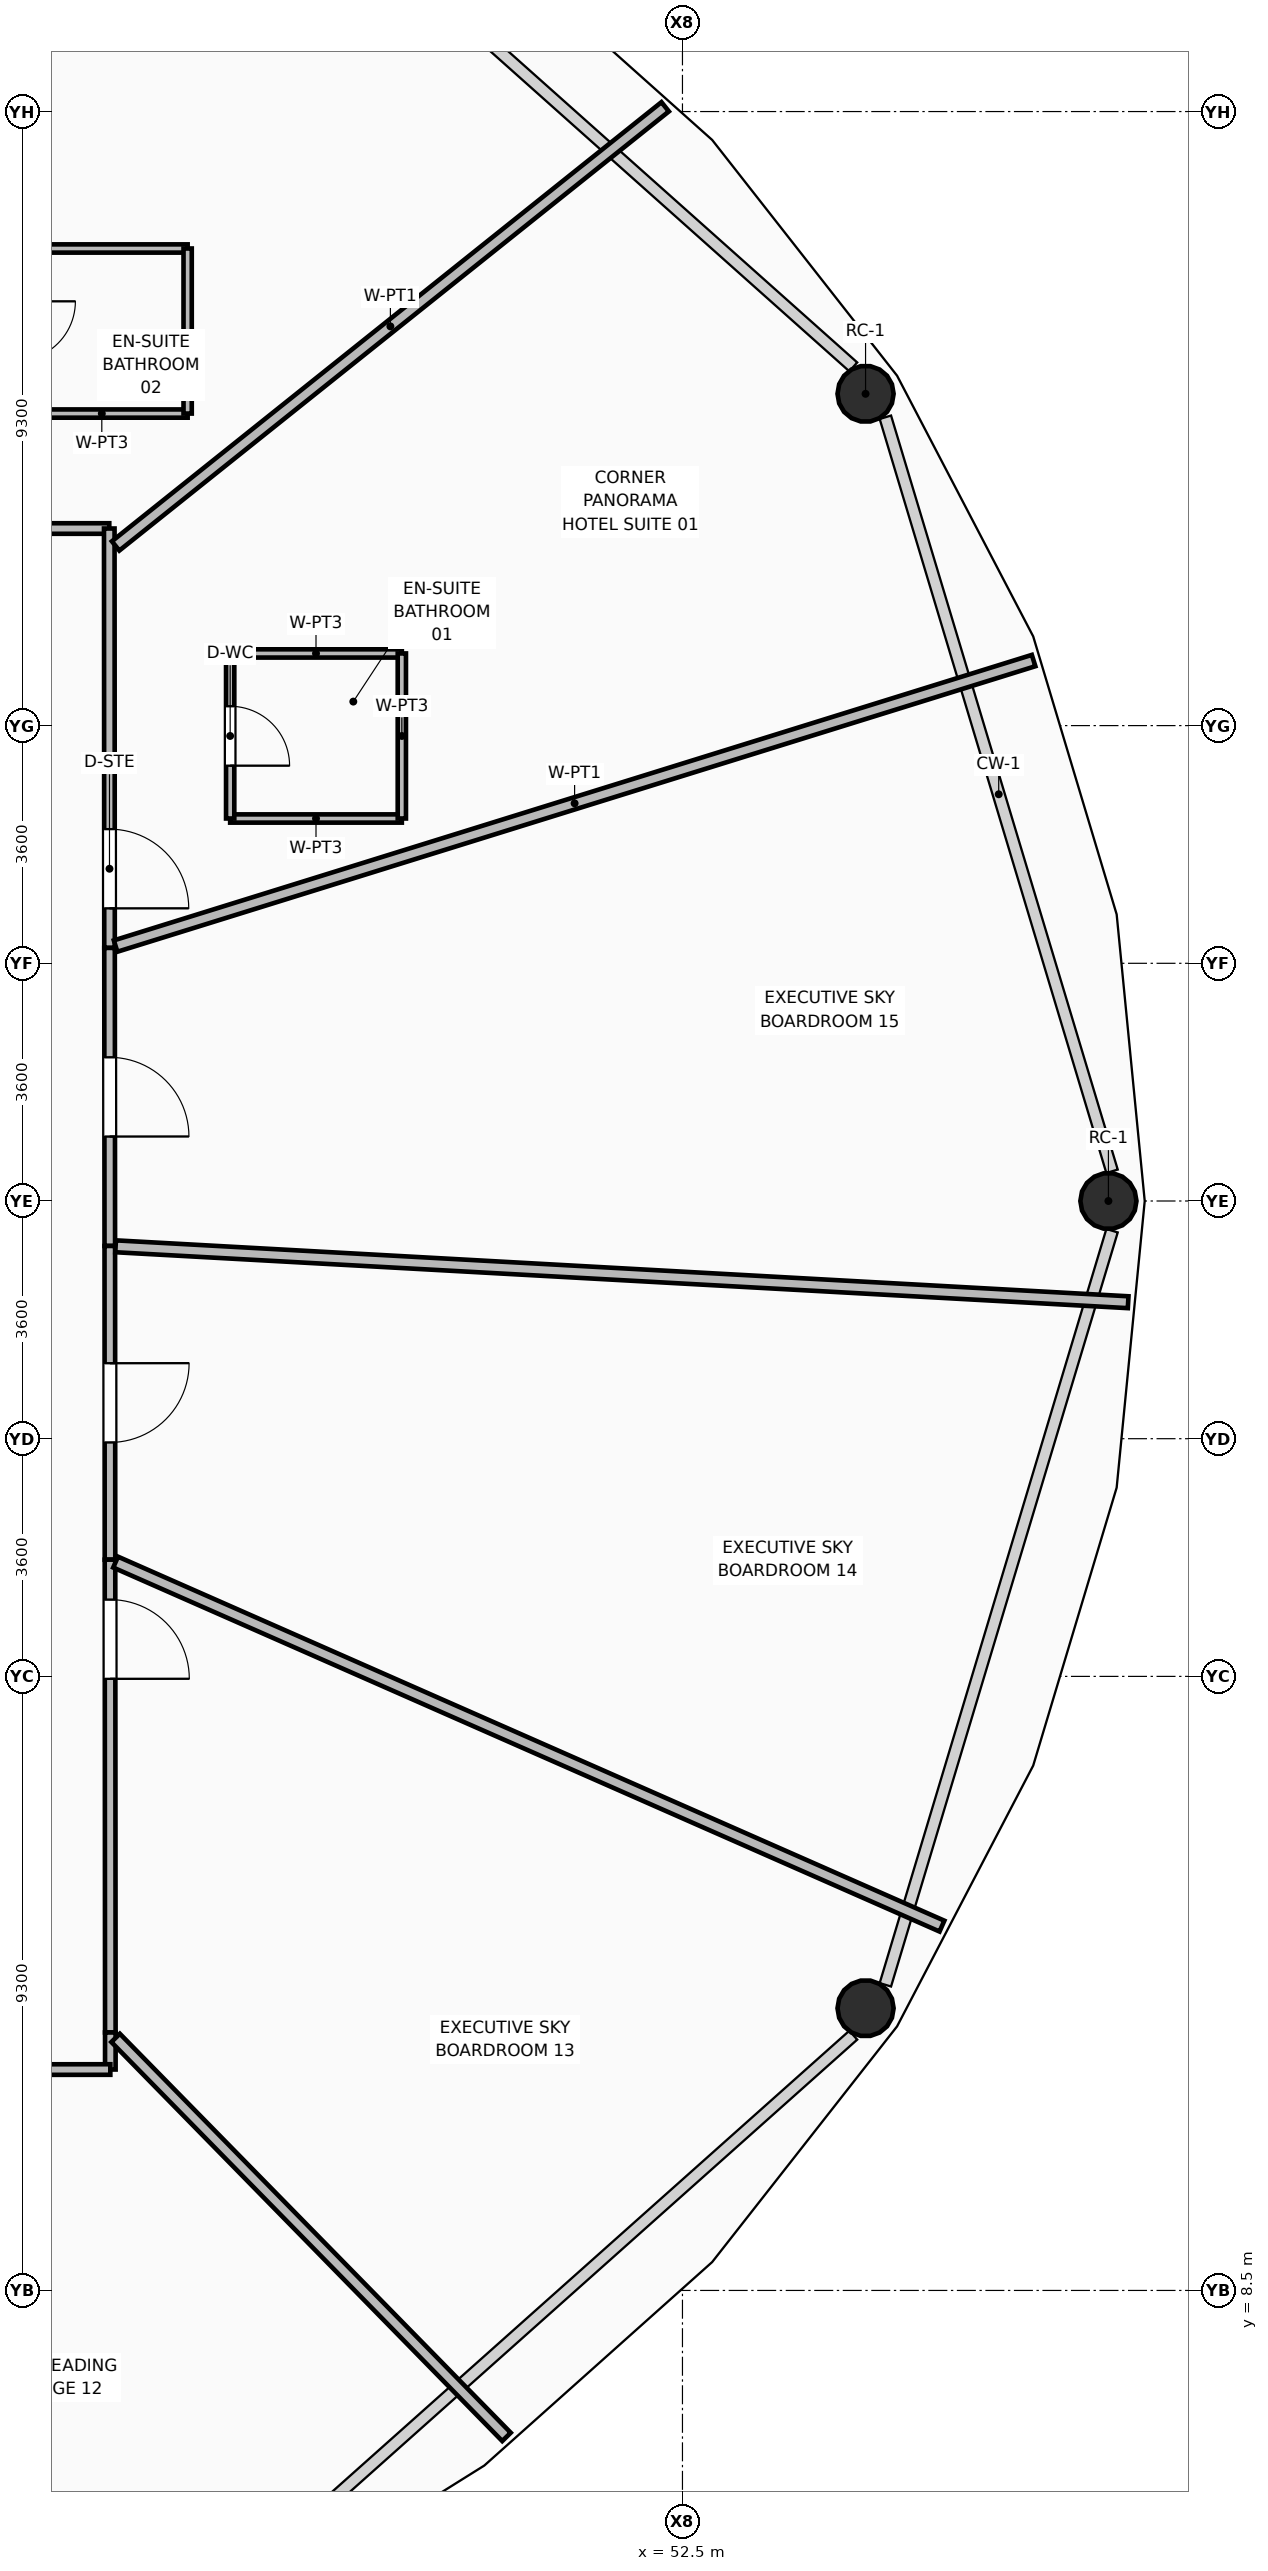
"""IFC4 building model, lengths in metres.
Left out: names, types, materials, properties, quantities, classifications, styles, units other than length and angle.
Written with IfcOpenShell. Run it as: python <this file> out.ifc"""

import sys

from ifc_helpers import new_model, si_unit, direction, frame, frame_2d, origin, origin_2d, place, context, subcontext, project, spatial, rectangle, hollow_circle, extrude, element, fill, save


model = new_model("IFC4")
c1 = context("Model", 3, precision=1e-05, world=origin(), true_north=direction((0.0, 1.0)))
c2 = subcontext(c1, "Body", "Model", "MODEL_VIEW")
j1 = project(units=[si_unit("LENGTHUNIT", "METRE"), si_unit("PLANEANGLEUNIT", "RADIAN")], contexts=[c1])
p1 = place(None, origin())
s1 = spatial("IfcSite", under=j1, at=p1, CompositionType="ELEMENT")
p2 = place(p1, origin())
s2 = spatial("IfcBuilding", under=s1, at=p2, CompositionType="ELEMENT")
p3 = place(p2, frame((0.0, 0.0, 60.75)))
s3 = spatial("IfcBuildingStorey", under=s2, at=p3, CompositionType="ELEMENT", Elevation=60.75)
for number, where, z_axis, x_axis in (
    (1, (58.951, 25.0, 0.0), (0.0, 0.0, 1.0), (1.0, 0.0, 0.0)),
    (2, (55.273, 37.225, 0.0), (0.0, 0.0, 1.0), (1.0, 0.0, 0.0)),
    (3, (55.273, 12.774, 0.0), (0.0, 0.0, 1.0), (1.0, 0.0, 0.0)),
):
    element("IfcColumn", number, at=place(p3, frame(where, z_axis=z_axis, x_axis=x_axis)), inside=s3, PredefinedType="COLUMN", context=c2, shape_type="SweptSolid", body=[
        extrude(hollow_circle(Radius=0.425, WallThickness=0.04, at=origin_2d()), origin(), (0.0, 0.0, 1.0), 3.57),
    ])
p4 = place(p3, frame((37.0, 35.185, 0.0), z_axis=(0.0, 0.0, 1.0), x_axis=(1.0, 0.0, 0.0)))
e4 = element("IfcWall", 4, at=p4, inside=s3, PredefinedType="PARTITIONING", context=c2, shape_type="SweptSolid", body=[
    extrude(rectangle(XDim=6.819, YDim=0.16, at=frame_2d((3.41, 0.0))), origin(), (0.0, 0.0, 1.0), 2.928),
])
p5 = place(p4, frame((1.338, 0.0, 0.0)))
e5 = element("IfcOpeningElement", 5, at=p5, cuts=e4, PredefinedType="OPENING", context=c2, shape_type="SweptSolid", body=[
    extrude(rectangle(XDim=1.2, YDim=2.1, at=frame_2d((0.6, 1.05))), frame((0.0, 0.09, 0.0), z_axis=(0.0, -1.0, 0.0), x_axis=(1.0, 0.0, 0.0)), (0.0, 0.0, 1.0), 0.18),
])
p6 = place(p3, frame((43.819, 35.185, 0.0), z_axis=(0.0, 0.0, 1.0), x_axis=(0.000614958758, -0.999999810913, 0.0)))
e6 = element("IfcWall", 6, at=p6, inside=s3, PredefinedType="PARTITIONING", context=c2, shape_type="SweptSolid", body=[
    extrude(rectangle(XDim=6.352, YDim=0.16, at=frame_2d((3.176, 0.0))), origin(), (0.0, 0.0, 1.0), 2.928),
])
p7 = place(p6, frame((4.553, 0.0, 0.0)))
e7 = element("IfcOpeningElement", 7, at=p7, cuts=e6, PredefinedType="OPENING", context=c2, shape_type="SweptSolid", body=[
    extrude(rectangle(XDim=1.2, YDim=2.1, at=frame_2d((0.6, 1.05))), frame((0.0, 0.09, 0.0), z_axis=(0.0, -1.0, 0.0), x_axis=(1.0, 0.0, 0.0)), (0.0, 0.0, 1.0), 0.18),
])
p8 = place(p3, frame((43.823, 28.833, 0.0), z_axis=(0.0, 0.0, 1.0), x_axis=(0.000865379091, -0.999999625559, 0.0)))
e8 = element("IfcWall", 8, at=p8, inside=s3, PredefinedType="PARTITIONING", context=c2, shape_type="SweptSolid", body=[
    extrude(rectangle(XDim=4.514, YDim=0.16, at=frame_2d((2.257, 0.0))), origin(), (0.0, 0.0, 1.0), 3.55),
])
p9 = place(p8, frame((1.657, 0.0, 0.0)))
e9 = element("IfcOpeningElement", 9, at=p9, cuts=e8, PredefinedType="OPENING", context=c2, shape_type="SweptSolid", body=[
    extrude(rectangle(XDim=1.2, YDim=2.1, at=frame_2d((0.6, 1.05))), frame((0.0, 0.09, 0.0), z_axis=(0.0, -1.0, 0.0), x_axis=(1.0, 0.0, 0.0)), (0.0, 0.0, 1.0), 0.18),
])
p10 = place(p3, frame((43.827, 24.319, 0.0), z_axis=(0.0, 0.0, 1.0), x_axis=(0.00066803685, -0.999999776863, 0.0)))
e10 = element("IfcWall", 10, at=p10, inside=s3, PredefinedType="PARTITIONING", context=c2, shape_type="SweptSolid", body=[
    extrude(rectangle(XDim=4.751, YDim=0.16, at=frame_2d((2.375, 0.0))), origin(), (0.0, 0.0, 1.0), 2.928),
])
p11 = place(p10, frame((1.776, 0.0, 0.0)))
e11 = element("IfcOpeningElement", 11, at=p11, cuts=e10, PredefinedType="OPENING", context=c2, shape_type="SweptSolid", body=[
    extrude(rectangle(XDim=1.2, YDim=2.1, at=frame_2d((0.6, 1.05))), frame((0.0, 0.09, 0.0), z_axis=(0.0, -1.0, 0.0), x_axis=(1.0, 0.0, 0.0)), (0.0, 0.0, 1.0), 0.18),
])
p12 = place(p3, frame((43.83, 19.568, 0.0), z_axis=(0.0, 0.0, 1.0), x_axis=(0.000681849016, -0.999999767541, 0.0)))
e12 = element("IfcWall", 12, at=p12, inside=s3, PredefinedType="PARTITIONING", context=c2, shape_type="SweptSolid", body=[
    extrude(rectangle(XDim=7.161, YDim=0.16, at=frame_2d((3.581, 0.0))), origin(), (0.0, 0.0, 1.0), 2.928),
])
p13 = place(p12, frame((0.605, 0.0, 0.0)))
e13 = element("IfcOpeningElement", 13, at=p13, cuts=e12, PredefinedType="OPENING", context=c2, shape_type="SweptSolid", body=[
    extrude(rectangle(XDim=1.2, YDim=2.1, at=frame_2d((0.6, 1.05))), frame((0.0, 0.09, 0.0), z_axis=(0.0, -1.0, 0.0), x_axis=(1.0, 0.0, 0.0)), (0.0, 0.0, 1.0), 0.18),
])
p14 = place(p3, frame((43.835, 12.407, 0.0), z_axis=(0.0, 0.0, 1.0), x_axis=(0.0, -1.0, 0.0)))
e14 = element("IfcWall", 14, at=p14, inside=s3, PredefinedType="PARTITIONING", context=c2, shape_type="SweptSolid", body=[
    extrude(rectangle(XDim=0.561, YDim=0.16, at=frame_2d((0.281, 0.0))), origin(), (0.0, 0.0, 1.0), 3.55),
])
p15 = place(p3, frame((43.835, 11.846, 0.0), z_axis=(0.0, 0.0, 1.0), x_axis=(-0.999999777452, -0.000667155766, 0.0)))
e15 = element("IfcWall", 15, at=p15, inside=s3, PredefinedType="PARTITIONING", context=c2, shape_type="SweptSolid", body=[
    extrude(rectangle(XDim=7.319, YDim=0.16, at=frame_2d((3.659, 0.0))), origin(), (0.0, 0.0, 1.0), 2.928),
])
p16 = place(p15, frame((2.985, 0.0, 0.0)))
e16 = element("IfcOpeningElement", 16, at=p16, cuts=e15, PredefinedType="OPENING", context=c2, shape_type="SweptSolid", body=[
    extrude(rectangle(XDim=1.2, YDim=2.1, at=frame_2d((0.6, 1.05))), frame((0.0, 0.09, 0.0), z_axis=(0.0, -1.0, 0.0), x_axis=(1.0, 0.0, 0.0)), (0.0, 0.0, 1.0), 0.18),
])
p17 = place(p3, frame((43.915, 28.861, 0.0), z_axis=(0.0, 0.0, 1.0), x_axis=(0.954884570259, 0.296977200271, 0.0)))
e17 = element("IfcWall", 17, at=p17, inside=s3, PredefinedType="PARTITIONING", context=c2, shape_type="SweptSolid", body=[
    extrude(rectangle(XDim=14.56, YDim=0.18, at=frame_2d((7.28, 0.0))), origin(), (0.0, 0.0, 1.0), 2.775),
])
p18 = place(p3, frame((43.915, 34.921, 0.0), z_axis=(0.0, 0.0, 1.0), x_axis=(0.781201807071, 0.624278572938, 0.0)))
e18 = element("IfcWall", 18, at=p18, inside=s3, PredefinedType="PARTITIONING", context=c2, shape_type="SweptSolid", body=[
    extrude(rectangle(XDim=10.654, YDim=0.18, at=frame_2d((5.327, 0.0))), origin(), (0.0, 0.0, 1.0), 2.775),
])
p19 = place(p3, frame((37.043, 35.265, 0.0), z_axis=(0.0, 0.0, 1.0), x_axis=(0.475167084094, 0.879895585961, 0.0)))
e19 = element("IfcWall", 19, at=p19, inside=s3, PredefinedType="PARTITIONING", context=c2, shape_type="SweptSolid", body=[
    extrude(rectangle(XDim=13.732, YDim=0.18, at=frame_2d((6.866, 0.0))), origin(), (0.0, 0.0, 1.0), 2.775),
])
p20 = place(p3, frame((43.915, 12.325, 0.0), z_axis=(0.0, 0.0, 1.0), x_axis=(0.699796666029, -0.714342093268, 0.0)))
e20 = element("IfcWall", 20, at=p20, inside=s3, PredefinedType="PARTITIONING", context=c2, shape_type="SweptSolid", body=[
    extrude(rectangle(XDim=8.459, YDim=0.18, at=frame_2d((4.23, 0.0))), origin(), (0.0, 0.0, 1.0), 2.775),
])
p21 = place(p3, frame((43.915, 19.531, 0.0), z_axis=(0.0, 0.0, 1.0), x_axis=(0.915142788341, -0.403129851223, 0.0)))
e21 = element("IfcWall", 21, at=p21, inside=s3, PredefinedType="PARTITIONING", context=c2, shape_type="SweptSolid", body=[
    extrude(rectangle(XDim=13.675, YDim=0.18, at=frame_2d((6.838, 0.0))), origin(), (0.0, 0.0, 1.0), 2.775),
])
p22 = place(p3, frame((43.915, 24.314, 0.0), z_axis=(0.0, 0.0, 1.0), x_axis=(0.998478397393, -0.055144264799, 0.0)))
e22 = element("IfcWall", 22, at=p22, inside=s3, PredefinedType="PARTITIONING", context=c2, shape_type="SweptSolid", body=[
    extrude(rectangle(XDim=15.358, YDim=0.18, at=frame_2d((7.679, 0.0))), origin(), (0.0, 0.0, 1.0), 2.775),
])
for number, where, z_axis, x_axis in (
    (23, (45.65, 30.793, 0.0), (0.0, 0.0, 1.0), (1.0, 0.0, 0.0)),
    (24, (45.65, 33.293, 0.0), (0.0, 0.0, 1.0), (1.0, 0.0, 0.0)),
):
    element("IfcWall", number, at=place(p3, frame(where, z_axis=z_axis, x_axis=x_axis)), inside=s3, PredefinedType="PARTITIONING", context=c2, shape_type="SweptSolid", body=[
        extrude(rectangle(XDim=2.6, YDim=0.125, at=frame_2d((1.3, 0.0))), origin(), (0.0, 0.0, 1.0), 3.55),
    ])
p23 = place(p3, frame((45.65, 30.793, 0.0), z_axis=(0.0, 0.0, 1.0), x_axis=(0.0, 1.0, 0.0)))
e25 = element("IfcWall", 25, at=p23, inside=s3, PredefinedType="PARTITIONING", context=c2, shape_type="SweptSolid", body=[
    extrude(rectangle(XDim=2.5, YDim=0.125, at=frame_2d((1.25, 0.0))), origin(), (0.0, 0.0, 1.0), 3.55),
])
p24 = place(p23, frame((0.8, 0.0, 0.0)))
e26 = element("IfcOpeningElement", 26, at=p24, cuts=e25, PredefinedType="OPENING", context=c2, shape_type="SweptSolid", body=[
    extrude(rectangle(XDim=0.9, YDim=2.1, at=frame_2d((0.45, 1.05))), frame((0.0, 0.073, 0.0), z_axis=(0.0, -1.0, 0.0), x_axis=(1.0, 0.0, 0.0)), (0.0, 0.0, 1.0), 0.145),
])
p25 = place(p3, frame((48.25, 30.793, 0.0), z_axis=(0.0, 0.0, 1.0), x_axis=(0.0, 1.0, 0.0)))
e27 = element("IfcWall", 27, at=p25, inside=s3, PredefinedType="PARTITIONING", context=c2, shape_type="SweptSolid", body=[
    extrude(rectangle(XDim=2.5, YDim=0.125, at=frame_2d((1.25, 0.0))), origin(), (0.0, 0.0, 1.0), 3.55),
])
for number, where, z_axis, x_axis in (
    (28, (42.406, 36.926, 0.0), (0.0, 0.0, 1.0), (1.0, 0.0, 0.0)),
    (29, (42.406, 39.426, 0.0), (0.0, 0.0, 1.0), (1.0, 0.0, 0.0)),
):
    element("IfcWall", number, at=place(p3, frame(where, z_axis=z_axis, x_axis=x_axis)), inside=s3, PredefinedType="PARTITIONING", context=c2, shape_type="SweptSolid", body=[
        extrude(rectangle(XDim=2.6, YDim=0.125, at=frame_2d((1.3, 0.0))), origin(), (0.0, 0.0, 1.0), 2.928),
    ])
p26 = place(p3, frame((45.006, 36.926, 0.0), z_axis=(0.0, 0.0, 1.0), x_axis=(0.0, 1.0, 0.0)))
e30 = element("IfcWall", 30, at=p26, inside=s3, PredefinedType="PARTITIONING", context=c2, shape_type="SweptSolid", body=[
    extrude(rectangle(XDim=2.5, YDim=0.125, at=frame_2d((1.25, 0.0))), origin(), (0.0, 0.0, 1.0), 3.55),
])
p27 = place(p24, frame((0.9, 0.0, 0.0), z_axis=(0.0, 0.0, 1.0), x_axis=(-1.0, 0.0, 0.0)))
e31 = element("IfcDoor", 31, at=p27, inside=s3, OperationType="SINGLE_SWING_RIGHT", PredefinedType="DOOR", context=c2, shape_type="SweptSolid", body=[
    extrude(rectangle(XDim=0.9, YDim=2.1, at=frame_2d((0.45, 1.05))), frame((0.0, 0.025, 0.0), z_axis=(0.0, -1.0, 0.0), x_axis=(1.0, 0.0, 0.0)), (0.0, 0.0, 1.0), 0.05),
])
fill(e26, e31)
p28 = place(p7, origin())
e32 = element("IfcDoor", 32, at=p28, inside=s3, OperationType="SINGLE_SWING_RIGHT", PredefinedType="DOOR", context=c2, shape_type="SweptSolid", body=[
    extrude(rectangle(XDim=1.2, YDim=2.1, at=frame_2d((0.6, 1.05))), frame((0.0, 0.025, 0.0), z_axis=(0.0, -1.0, 0.0), x_axis=(1.0, 0.0, 0.0)), (0.0, 0.0, 1.0), 0.05),
])
fill(e7, e32)
p29 = place(p13, origin())
e33 = element("IfcDoor", 33, at=p29, inside=s3, OperationType="SINGLE_SWING_RIGHT", PredefinedType="DOOR", context=c2, shape_type="SweptSolid", body=[
    extrude(rectangle(XDim=1.2, YDim=2.1, at=frame_2d((0.6, 1.05))), frame((0.0, 0.025, 0.0), z_axis=(0.0, -1.0, 0.0), x_axis=(1.0, 0.0, 0.0)), (0.0, 0.0, 1.0), 0.05),
])
fill(e13, e33)
p30 = place(p11, origin())
e34 = element("IfcDoor", 34, at=p30, inside=s3, OperationType="SINGLE_SWING_LEFT", PredefinedType="DOOR", context=c2, shape_type="SweptSolid", body=[
    extrude(rectangle(XDim=1.2, YDim=2.1, at=frame_2d((0.6, 1.05))), frame((0.0, 0.025, 0.0), z_axis=(0.0, -1.0, 0.0), x_axis=(1.0, 0.0, 0.0)), (0.0, 0.0, 1.0), 0.05),
])
fill(e11, e34)
p31 = place(p9, origin())
e35 = element("IfcDoor", 35, at=p31, inside=s3, OperationType="SINGLE_SWING_RIGHT", PredefinedType="DOOR", context=c2, shape_type="SweptSolid", body=[
    extrude(rectangle(XDim=1.2, YDim=2.1, at=frame_2d((0.6, 1.05))), frame((0.0, 0.025, 0.0), z_axis=(0.0, -1.0, 0.0), x_axis=(1.0, 0.0, 0.0)), (0.0, 0.0, 1.0), 0.05),
])
fill(e9, e35)
save(model, sys.argv[1])
